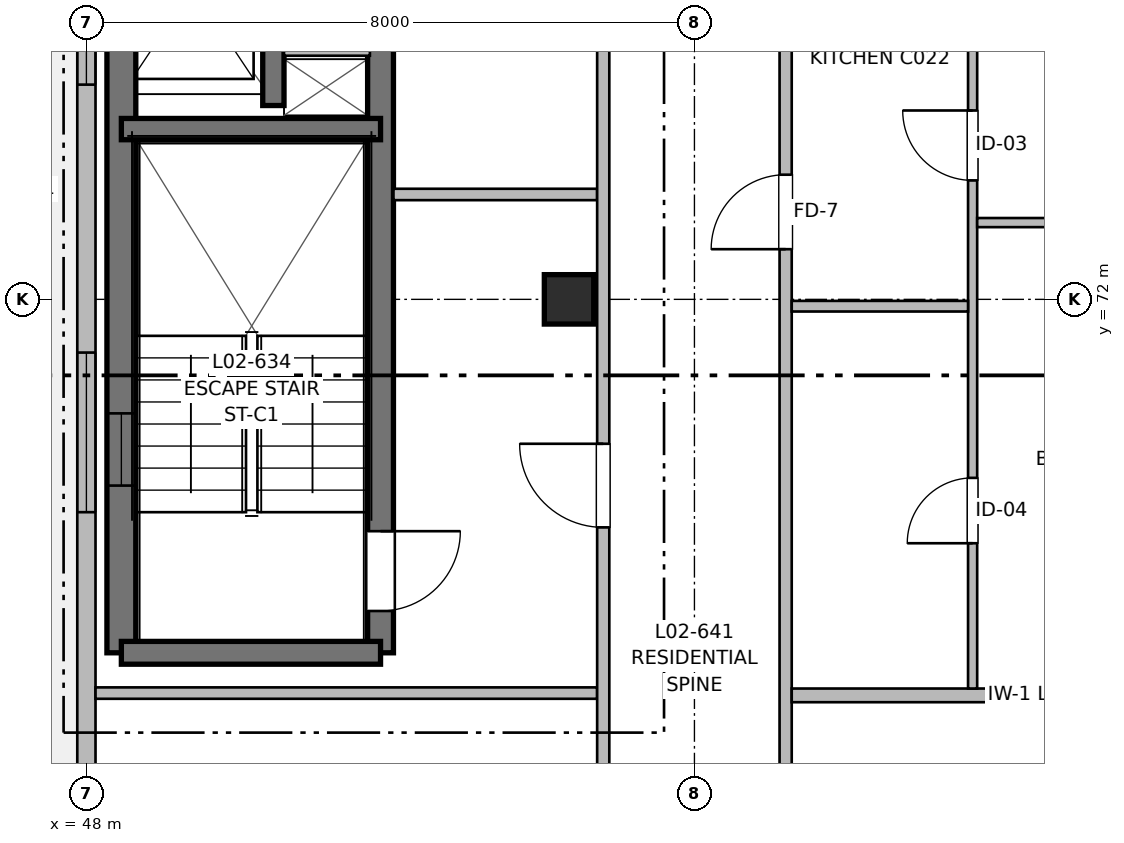
"""IFC4 building model, lengths in metres.
Left out: names, types, materials, properties, quantities, classifications, styles, units other than length and angle.
Written with IfcOpenShell. Run it as: python <this file> out.ifc"""

import sys

from ifc_helpers import new_model, si_unit, direction, frame, frame_2d, origin, origin_2d, place, context, subcontext, project, spatial, rectangle, extrude, element, fill, save


model = new_model("IFC4")
c1 = context("Model", 3, precision=1e-05, world=origin(), true_north=direction((0.0, 1.0)))
c2 = subcontext(c1, "Body", "Model", "MODEL_VIEW")
j1 = project(units=[si_unit("LENGTHUNIT", "METRE"), si_unit("PLANEANGLEUNIT", "RADIAN")], contexts=[c1])
p1 = place(None, origin())
s1 = spatial("IfcSite", under=j1, at=p1, CompositionType="ELEMENT")
p2 = place(p1, origin())
s2 = spatial("IfcBuilding", under=s1, at=p2, CompositionType="ELEMENT")
p3 = place(p2, frame((0.0, 0.0, 7.36)))
s3 = spatial("IfcBuildingStorey", under=s2, at=p3, CompositionType="ELEMENT", Elevation=7.36)
p4 = place(p3, frame((54.35, 72.0, 0.0), z_axis=(0.0, 0.0, 1.0), x_axis=(1.0, 0.0, 0.0)))
e1 = element("IfcColumn", 1, at=p4, inside=s3, PredefinedType="COLUMN", context=c2, shape_type="SweptSolid", body=[
    extrude(rectangle(XDim=0.65, YDim=0.65, at=origin_2d()), origin(), (0.0, 0.0, 1.0), 3.2),
])
p5 = place(p3, frame((48.46, 67.35, 0.0), z_axis=(0.0, 0.0, 1.0), x_axis=(0.0, 1.0, 0.0)))
e2 = element("IfcWall", 2, at=p5, inside=s3, PredefinedType="SHEAR", context=c2, shape_type="SweptSolid", body=[
    extrude(rectangle(XDim=12.45, YDim=0.38, at=frame_2d((6.225, 0.0))), origin(), (0.0, 0.0, 1.0), 3.2),
])
p6 = place(p5, frame((2.2, 0.0, 0.97)))
e3 = element("IfcOpeningElement", 3, at=p6, cuts=e2, PredefinedType="OPENING", context=c2, shape_type="SweptSolid", body=[
    extrude(rectangle(XDim=0.95, YDim=1.25, at=frame_2d((0.475, 0.625))), frame((0.0, 0.2, 0.0), z_axis=(0.0, -1.0, 0.0), x_axis=(1.0, 0.0, 0.0)), (0.0, 0.0, 1.0), 0.4),
])
p7 = place(p3, frame((51.87, 79.8, 0.0), z_axis=(0.0, 0.0, 1.0), x_axis=(0.0, -1.0, 0.0)))
e4 = element("IfcWall", 4, at=p7, inside=s3, PredefinedType="SHEAR", context=c2, shape_type="SweptSolid", body=[
    extrude(rectangle(XDim=12.45, YDim=0.34, at=frame_2d((6.225, 0.0))), origin(), (0.0, 0.0, 1.0), 3.2),
])
p8 = place(p7, frame((10.85, 0.0, 0.0)))
e5 = element("IfcOpeningElement", 5, at=p8, cuts=e4, PredefinedType="OPENING", context=c2, shape_type="SweptSolid", body=[
    extrude(rectangle(XDim=1.05, YDim=2.15, at=frame_2d((0.525, 1.075))), frame((0.0, 0.18, 0.0), z_axis=(0.0, -1.0, 0.0), x_axis=(1.0, 0.0, 0.0)), (0.0, 0.0, 1.0), 0.36),
])
p9 = place(p3, frame((51.87, 67.35, 0.0), z_axis=(0.0, 0.0, 1.0), x_axis=(-1.0, 0.0, 0.0)))
e6 = element("IfcWall", 6, at=p9, inside=s3, PredefinedType="SHEAR", context=c2, shape_type="SweptSolid", body=[
    extrude(rectangle(XDim=3.41, YDim=0.3, at=frame_2d((1.705, 0.0))), origin(), (0.0, 0.0, 1.0), 3.2),
])
p10 = place(p3, frame((48.46, 74.24, 0.0), z_axis=(0.0, 0.0, 1.0), x_axis=(1.0, 0.0, 0.0)))
e7 = element("IfcWall", 7, at=p10, inside=s3, PredefinedType="SHEAR", context=c2, shape_type="SweptSolid", body=[
    extrude(rectangle(XDim=3.41, YDim=0.28, at=frame_2d((1.705, 0.0))), origin(), (0.0, 0.0, 1.0), 3.2),
])
p11 = place(p3, frame((50.46, 74.55, 0.0), z_axis=(0.0, 0.0, 1.0), x_axis=(0.0, 1.0, 0.0)))
e8 = element("IfcWall", 8, at=p11, inside=s3, PredefinedType="SHEAR", context=c2, shape_type="SweptSolid", body=[
    extrude(rectangle(XDim=5.25, YDim=0.28, at=frame_2d((2.625, 0.0))), origin(), (0.0, 0.0, 1.0), 3.2),
])
p12 = place(p11, frame((1.15, 0.0, 0.0)))
e9 = element("IfcOpeningElement", 9, at=p12, cuts=e8, PredefinedType="OPENING", context=c2, shape_type="SweptSolid", body=[
    extrude(rectangle(XDim=1.0, YDim=2.15, at=frame_2d((0.5, 1.075))), frame((0.0, 0.15, 0.0), z_axis=(0.0, -1.0, 0.0), x_axis=(1.0, 0.0, 0.0)), (0.0, 0.0, 1.0), 0.3),
])
p13 = place(p11, frame((3.85, 0.0, 0.0)))
e10 = element("IfcOpeningElement", 10, at=p13, cuts=e8, PredefinedType="OPENING", context=c2, shape_type="SweptSolid", body=[
    extrude(rectangle(XDim=0.9, YDim=2.15, at=frame_2d((0.45, 1.075))), frame((0.0, 0.15, 0.0), z_axis=(0.0, -1.0, 0.0), x_axis=(1.0, 0.0, 0.0)), (0.0, 0.0, 1.0), 0.3),
])
p14 = place(p3, frame((50.6, 75.28, 0.0), z_axis=(0.0, 0.0, 1.0), x_axis=(1.0, 0.0, 0.0)))
e11 = element("IfcWall", 11, at=p14, inside=s3, PredefinedType="PARTITIONING", context=c2, shape_type="SweptSolid", body=[
    extrude(rectangle(XDim=1.13, YDim=0.15, at=frame_2d((0.565, 0.0))), origin(), (0.0, 0.0, 1.0), 2.95),
])
p15 = place(p3, frame((48.0, 56.0, 0.0), z_axis=(0.0, 0.0, 1.0), x_axis=(0.0, 1.0, 0.0)))
e12 = element("IfcWall", 12, at=p15, inside=s3, PredefinedType="SOLIDWALL", context=c2, shape_type="SweptSolid", body=[
    extrude(rectangle(XDim=38.0, YDim=0.24, at=frame_2d((19.0, 0.0))), origin(), (0.0, 0.0, 1.0), 2.98),
])
p16 = place(p15, frame((4.95, 0.0, 0.0)))
e13 = element("IfcOpeningElement", 13, at=p16, cuts=e12, PredefinedType="OPENING", context=c2, shape_type="SweptSolid", body=[
    extrude(rectangle(XDim=1.2, YDim=2.2, at=frame_2d((0.6, 1.1))), frame((0.0, 0.13, 0.0), z_axis=(0.0, -1.0, 0.0), x_axis=(1.0, 0.0, 0.0)), (0.0, 0.0, 1.0), 0.26),
])
p17 = place(p15, frame((13.2, 0.0, 0.67)))
e14 = element("IfcOpeningElement", 14, at=p17, cuts=e12, PredefinedType="OPENING", context=c2, shape_type="SweptSolid", body=[
    extrude(rectangle(XDim=2.1, YDim=1.55, at=frame_2d((1.05, 0.775))), frame((0.0, 0.13, 0.0), z_axis=(0.0, -1.0, 0.0), x_axis=(1.0, 0.0, 0.0)), (0.0, 0.0, 1.0), 0.26),
])
p18 = place(p15, frame((18.825, 0.0, 0.72)))
e15 = element("IfcOpeningElement", 15, at=p18, cuts=e12, PredefinedType="OPENING", context=c2, shape_type="SweptSolid", body=[
    extrude(rectangle(XDim=2.25, YDim=1.5, at=frame_2d((1.125, 0.75))), frame((0.0, 0.13, 0.0), z_axis=(0.0, -1.0, 0.0), x_axis=(1.0, 0.0, 0.0)), (0.0, 0.0, 1.0), 0.26),
])
p19 = place(p15, frame((32.725, 0.0, 0.9)))
e16 = element("IfcOpeningElement", 16, at=p19, cuts=e12, PredefinedType="OPENING", context=c2, shape_type="SweptSolid", body=[
    extrude(rectangle(XDim=1.05, YDim=1.15, at=frame_2d((0.525, 0.575))), frame((0.0, 0.13, 0.0), z_axis=(0.0, -1.0, 0.0), x_axis=(1.0, 0.0, 0.0)), (0.0, 0.0, 1.0), 0.26),
])
p20 = place(p3, frame((48.12, 66.82, 0.0), z_axis=(0.0, 0.0, 1.0), x_axis=(1.0, 0.0, 0.0)))
e17 = element("IfcWall", 17, at=p20, inside=s3, PredefinedType="PARTITIONING", context=c2, shape_type="SweptSolid", body=[
    extrude(rectangle(XDim=6.6, YDim=0.15, at=frame_2d((3.3, 0.0))), origin(), (0.0, 0.0, 1.0), 2.935),
])
p21 = place(p3, frame((52.04, 73.38, 0.0), z_axis=(0.0, 0.0, 1.0), x_axis=(1.0, 0.0, 0.0)))
e18 = element("IfcWall", 18, at=p21, inside=s3, PredefinedType="PARTITIONING", context=c2, shape_type="SweptSolid", body=[
    extrude(rectangle(XDim=2.68, YDim=0.15, at=frame_2d((1.34, 0.0))), origin(), (0.0, 0.0, 1.0), 2.935),
])
p22 = place(p3, frame((54.8, 56.18, 0.0), z_axis=(0.0, 0.0, 1.0), x_axis=(0.0, 1.0, 0.0)))
e19 = element("IfcWall", 19, at=p22, inside=s3, PredefinedType="PARTITIONING", context=c2, shape_type="SweptSolid", body=[
    extrude(rectangle(XDim=50.62, YDim=0.16, at=frame_2d((25.31, 0.0))), origin(), (0.0, 0.0, 1.0), 2.935),
])
p23 = place(p22, frame((12.82, 0.0, 0.0)))
e20 = element("IfcOpeningElement", 20, at=p23, cuts=e19, PredefinedType="OPENING", context=c2, shape_type="SweptSolid", body=[
    extrude(rectangle(XDim=1.1, YDim=2.15, at=frame_2d((0.55, 1.075))), frame((0.0, 0.09, 0.0), z_axis=(0.0, -1.0, 0.0), x_axis=(1.0, 0.0, 0.0)), (0.0, 0.0, 1.0), 0.18),
])
p24 = place(p22, frame((19.22, 0.0, 0.0)))
e21 = element("IfcOpeningElement", 21, at=p24, cuts=e19, PredefinedType="OPENING", context=c2, shape_type="SweptSolid", body=[
    extrude(rectangle(XDim=1.6, YDim=2.15, at=frame_2d((0.8, 1.075))), frame((0.0, 0.09, 0.0), z_axis=(0.0, -1.0, 0.0), x_axis=(1.0, 0.0, 0.0)), (0.0, 0.0, 1.0), 0.18),
])
p25 = place(p22, frame((1.8, 0.0, 0.0)))
e22 = element("IfcOpeningElement", 22, at=p25, cuts=e19, PredefinedType="OPENING", context=c2, shape_type="SweptSolid", body=[
    extrude(rectangle(XDim=0.96, YDim=2.15, at=frame_2d((0.48, 1.075))), frame((0.0, 0.09, 0.0), z_axis=(0.0, -1.0, 0.0), x_axis=(1.0, 0.0, 0.0)), (0.0, 0.0, 1.0), 0.18),
])
p26 = place(p22, frame((32.625, 0.0, 0.0)))
e23 = element("IfcOpeningElement", 23, at=p26, cuts=e19, PredefinedType="OPENING", context=c2, shape_type="SweptSolid", body=[
    extrude(rectangle(XDim=0.98, YDim=2.15, at=frame_2d((0.49, 1.075))), frame((0.0, 0.09, 0.0), z_axis=(0.0, -1.0, 0.0), x_axis=(1.0, 0.0, 0.0)), (0.0, 0.0, 1.0), 0.18),
])
p27 = place(p22, frame((41.235, 0.0, 0.0)))
e24 = element("IfcOpeningElement", 24, at=p27, cuts=e19, PredefinedType="OPENING", context=c2, shape_type="SweptSolid", body=[
    extrude(rectangle(XDim=0.98, YDim=2.15, at=frame_2d((0.49, 1.075))), frame((0.0, 0.09, 0.0), z_axis=(0.0, -1.0, 0.0), x_axis=(1.0, 0.0, 0.0)), (0.0, 0.0, 1.0), 0.18),
])
p28 = place(p3, frame((57.2, 56.18, 0.0), z_axis=(0.0, 0.0, 1.0), x_axis=(0.0, 1.0, 0.0)))
e25 = element("IfcWall", 25, at=p28, inside=s3, PredefinedType="PARTITIONING", context=c2, shape_type="SweptSolid", body=[
    extrude(rectangle(XDim=50.62, YDim=0.16, at=frame_2d((25.31, 0.0))), origin(), (0.0, 0.0, 1.0), 2.935),
])
p29 = place(p28, frame((4.51, 0.0, 0.0)))
e26 = element("IfcOpeningElement", 26, at=p29, cuts=e25, PredefinedType="OPENING", context=c2, shape_type="SweptSolid", body=[
    extrude(rectangle(XDim=1.5, YDim=2.2, at=frame_2d((0.75, 1.1))), frame((0.0, 0.09, 0.0), z_axis=(0.0, -1.0, 0.0), x_axis=(1.0, 0.0, 0.0)), (0.0, 0.0, 1.0), 0.18),
])
p30 = place(p28, frame((16.48, 0.0, 0.0)))
e27 = element("IfcOpeningElement", 27, at=p30, cuts=e25, PredefinedType="OPENING", context=c2, shape_type="SweptSolid", body=[
    extrude(rectangle(XDim=0.98, YDim=2.15, at=frame_2d((0.49, 1.075))), frame((0.0, 0.09, 0.0), z_axis=(0.0, -1.0, 0.0), x_axis=(1.0, 0.0, 0.0)), (0.0, 0.0, 1.0), 0.18),
])
p31 = place(p28, frame((28.53, 0.0, 0.0)))
e28 = element("IfcOpeningElement", 28, at=p31, cuts=e25, PredefinedType="OPENING", context=c2, shape_type="SweptSolid", body=[
    extrude(rectangle(XDim=0.98, YDim=2.15, at=frame_2d((0.49, 1.075))), frame((0.0, 0.09, 0.0), z_axis=(0.0, -1.0, 0.0), x_axis=(1.0, 0.0, 0.0)), (0.0, 0.0, 1.0), 0.18),
])
p32 = place(p28, frame((42.88, 0.0, 0.0)))
e29 = element("IfcOpeningElement", 29, at=p32, cuts=e25, PredefinedType="OPENING", context=c2, shape_type="SweptSolid", body=[
    extrude(rectangle(XDim=0.98, YDim=2.15, at=frame_2d((0.49, 1.075))), frame((0.0, 0.09, 0.0), z_axis=(0.0, -1.0, 0.0), x_axis=(1.0, 0.0, 0.0)), (0.0, 0.0, 1.0), 0.18),
])
p33 = place(p3, frame((57.28, 66.79, 0.0), z_axis=(0.0, 0.0, 1.0), x_axis=(1.0, 0.0, 0.0)))
e30 = element("IfcWall", 30, at=p33, inside=s3, PredefinedType="PARTITIONING", context=c2, shape_type="SweptSolid", body=[
    extrude(rectangle(XDim=6.6, YDim=0.18, at=frame_2d((3.3, 0.0))), origin(), (0.0, 0.0, 1.0), 2.935),
])
p34 = place(p3, frame((59.66, 66.88, 0.0), z_axis=(0.0, 0.0, 1.0), x_axis=(0.0, 1.0, 0.0)))
e31 = element("IfcWall", 31, at=p34, inside=s3, PredefinedType="PARTITIONING", context=c2, shape_type="SweptSolid", body=[
    extrude(rectangle(XDim=10.94, YDim=0.12, at=frame_2d((5.47, 0.0))), origin(), (0.0, 0.0, 1.0), 2.935),
])
p35 = place(p34, frame((1.911, 0.0, 0.0)))
e32 = element("IfcOpeningElement", 32, at=p35, cuts=e31, PredefinedType="OPENING", context=c2, shape_type="SweptSolid", body=[
    extrude(rectangle(XDim=0.86, YDim=2.1, at=frame_2d((0.43, 1.05))), frame((0.0, 0.07, 0.0), z_axis=(0.0, -1.0, 0.0), x_axis=(1.0, 0.0, 0.0)), (0.0, 0.0, 1.0), 0.14),
])
p36 = place(p34, frame((6.685, 0.0, 0.0)))
e33 = element("IfcOpeningElement", 33, at=p36, cuts=e31, PredefinedType="OPENING", context=c2, shape_type="SweptSolid", body=[
    extrude(rectangle(XDim=0.92, YDim=2.1, at=frame_2d((0.46, 1.05))), frame((0.0, 0.07, 0.0), z_axis=(0.0, -1.0, 0.0), x_axis=(1.0, 0.0, 0.0)), (0.0, 0.0, 1.0), 0.14),
])
p37 = place(p3, frame((57.28, 71.91, 0.0), z_axis=(0.0, 0.0, 1.0), x_axis=(1.0, 0.0, 0.0)))
e34 = element("IfcWall", 34, at=p37, inside=s3, PredefinedType="PARTITIONING", context=c2, shape_type="SweptSolid", body=[
    extrude(rectangle(XDim=2.32, YDim=0.14, at=frame_2d((1.16, 0.0))), origin(), (0.0, 0.0, 1.0), 2.53),
])
p38 = place(p3, frame((59.72, 73.01, 0.0), z_axis=(0.0, 0.0, 1.0), x_axis=(1.0, 0.0, 0.0)))
e35 = element("IfcWall", 35, at=p38, inside=s3, PredefinedType="PARTITIONING", context=c2, shape_type="SweptSolid", body=[
    extrude(rectangle(XDim=4.16, YDim=0.12, at=frame_2d((2.08, 0.0))), origin(), (0.0, 0.0, 1.0), 2.935),
])
p39 = place(p38, frame((1.63, 0.0, 0.0)))
e36 = element("IfcOpeningElement", 36, at=p39, cuts=e35, PredefinedType="OPENING", context=c2, shape_type="SweptSolid", body=[
    extrude(rectangle(XDim=0.9, YDim=2.1, at=frame_2d((0.45, 1.05))), frame((0.0, 0.07, 0.0), z_axis=(0.0, -1.0, 0.0), x_axis=(1.0, 0.0, 0.0)), (0.0, 0.0, 1.0), 0.14),
])
p40 = place(p8, origin())
e37 = element("IfcDoor", 37, at=p40, inside=s3, OperationType="SINGLE_SWING_LEFT", PredefinedType="DOOR", context=c2, shape_type="SweptSolid", body=[
    extrude(rectangle(XDim=1.05, YDim=2.15, at=frame_2d((0.525, 1.075))), frame((0.0, 0.025, 0.0), z_axis=(0.0, -1.0, 0.0), x_axis=(1.0, 0.0, 0.0)), (0.0, 0.0, 1.0), 0.05),
])
fill(e5, e37)
p41 = place(p6, origin())
e38 = element("IfcWindow", 38, at=p41, inside=s3, PartitioningType="SINGLE_PANEL", PredefinedType="WINDOW", context=c2, shape_type="SweptSolid", body=[
    extrude(rectangle(XDim=0.95, YDim=1.25, at=frame_2d((0.475, 0.625))), frame((0.0, 0.03, 0.0), z_axis=(0.0, -1.0, 0.0), x_axis=(1.0, 0.0, 0.0)), (0.0, 0.0, 1.0), 0.06),
])
fill(e3, e38)
p42 = place(p17, origin())
e39 = element("IfcWindow", 39, at=p42, inside=s3, PartitioningType="SINGLE_PANEL", PredefinedType="WINDOW", context=c2, shape_type="SweptSolid", body=[
    extrude(rectangle(XDim=2.1, YDim=1.55, at=frame_2d((1.05, 0.775))), frame((0.0, 0.03, 0.0), z_axis=(0.0, -1.0, 0.0), x_axis=(1.0, 0.0, 0.0)), (0.0, 0.0, 1.0), 0.06),
])
fill(e14, e39)
p43 = place(p18, origin())
e40 = element("IfcWindow", 40, at=p43, inside=s3, PartitioningType="SINGLE_PANEL", PredefinedType="WINDOW", context=c2, shape_type="SweptSolid", body=[
    extrude(rectangle(XDim=2.25, YDim=1.5, at=frame_2d((1.125, 0.75))), frame((0.0, 0.03, 0.0), z_axis=(0.0, -1.0, 0.0), x_axis=(1.0, 0.0, 0.0)), (0.0, 0.0, 1.0), 0.06),
])
fill(e15, e40)
p44 = place(p23, origin())
e41 = element("IfcDoor", 41, at=p44, inside=s3, OperationType="SINGLE_SWING_RIGHT", PredefinedType="DOOR", context=c2, shape_type="SweptSolid", body=[
    extrude(rectangle(XDim=1.1, YDim=2.15, at=frame_2d((0.55, 1.075))), frame((0.0, 0.025, 0.0), z_axis=(0.0, -1.0, 0.0), x_axis=(1.0, 0.0, 0.0)), (0.0, 0.0, 1.0), 0.05),
])
fill(e20, e41)
p45 = place(p35, origin())
e42 = element("IfcDoor", 42, at=p45, inside=s3, OperationType="SINGLE_SWING_LEFT", PredefinedType="DOOR", context=c2, shape_type="SweptSolid", body=[
    extrude(rectangle(XDim=0.86, YDim=2.1, at=frame_2d((0.43, 1.05))), frame((0.0, 0.025, 0.0), z_axis=(0.0, -1.0, 0.0), x_axis=(1.0, 0.0, 0.0)), (0.0, 0.0, 1.0), 0.05),
])
fill(e32, e42)
p46 = place(p36, origin())
e43 = element("IfcDoor", 43, at=p46, inside=s3, OperationType="SINGLE_SWING_RIGHT", PredefinedType="DOOR", context=c2, shape_type="SweptSolid", body=[
    extrude(rectangle(XDim=0.92, YDim=2.1, at=frame_2d((0.46, 1.05))), frame((0.0, 0.025, 0.0), z_axis=(0.0, -1.0, 0.0), x_axis=(1.0, 0.0, 0.0)), (0.0, 0.0, 1.0), 0.05),
])
fill(e33, e43)
p47 = place(p30, origin())
e44 = element("IfcDoor", 44, at=p47, inside=s3, OperationType="SINGLE_SWING_LEFT", PredefinedType="DOOR", context=c2, shape_type="SweptSolid", body=[
    extrude(rectangle(XDim=0.98, YDim=2.15, at=frame_2d((0.49, 1.075))), frame((0.0, 0.025, 0.0), z_axis=(0.0, -1.0, 0.0), x_axis=(1.0, 0.0, 0.0)), (0.0, 0.0, 1.0), 0.05),
])
fill(e27, e44)
save(model, sys.argv[1])
